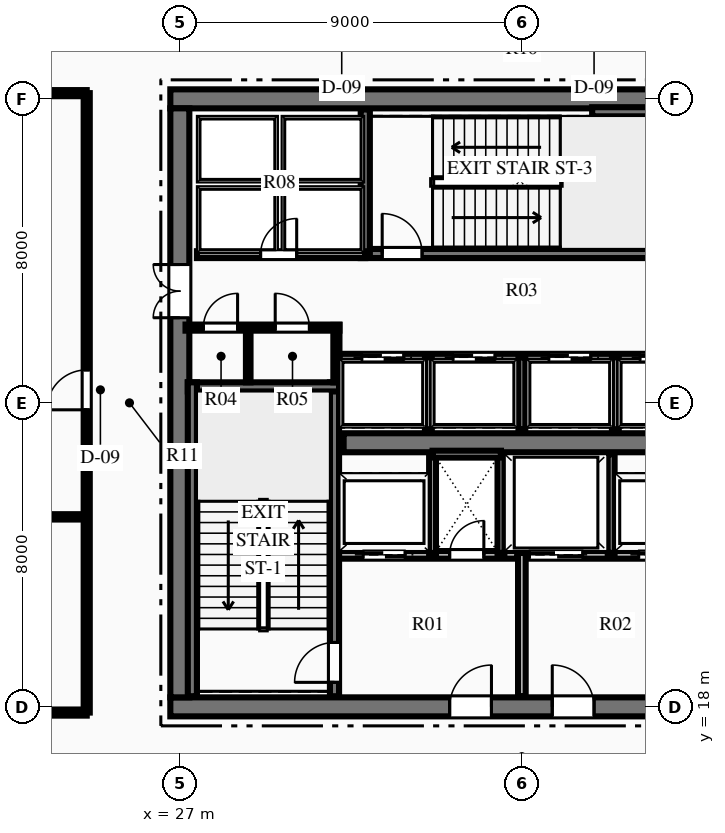
"""IFC4 building model, lengths in metres.
Left out: names, types, materials, properties, quantities, classifications, styles, units other than length and angle.
Written with IfcOpenShell. Run it as: python <this file> out.ifc"""

import sys

from ifc_helpers import new_model, si_unit, direction, frame, frame_2d, origin, place, context, subcontext, project, spatial, rectangle, extrude, element, fill, save


model = new_model("IFC4")
c1 = context("Model", 3, precision=1e-05, world=origin(), true_north=direction((0.0, 1.0)))
c2 = subcontext(c1, "Body", "Model", "MODEL_VIEW")
j1 = project(units=[si_unit("LENGTHUNIT", "METRE"), si_unit("PLANEANGLEUNIT", "RADIAN")], contexts=[c1])
p1 = place(None, origin())
s1 = spatial("IfcSite", under=j1, at=p1, CompositionType="ELEMENT")
p2 = place(p1, origin())
s2 = spatial("IfcBuilding", under=s1, at=p2, CompositionType="ELEMENT")
p3 = place(p2, frame((0.0, 0.0, 136.2)))
s3 = spatial("IfcBuildingStorey", under=s2, at=p3, CompositionType="ELEMENT", Elevation=136.2)
p4 = place(p3, frame((26.75, 18.0, 0.0), z_axis=(0.0, 0.0, 1.0), x_axis=(1.0, 0.0, 0.0)))
e1 = element("IfcWall", 1, at=p4, inside=s3, PredefinedType="SHEAR", context=c2, shape_type="SweptSolid", body=[
    extrude(rectangle(XDim=18.5, YDim=0.5, at=frame_2d((9.25, 0.0))), origin(), (0.0, 0.0, 1.0), 4.5),
])
p5 = place(p4, frame((7.35, 0.0, 0.0)))
e2 = element("IfcOpeningElement", 2, at=p5, cuts=e1, PredefinedType="OPENING", context=c2, shape_type="SweptSolid", body=[
    extrude(rectangle(XDim=1.1, YDim=2.15, at=frame_2d((0.55, 1.075))), frame((0.0, 0.26, 0.0), z_axis=(0.0, -1.0, 0.0), x_axis=(1.0, 0.0, 0.0)), (0.0, 0.0, 1.0), 0.52),
])
p6 = place(p4, frame((10.05, 0.0, 0.0)))
e3 = element("IfcOpeningElement", 3, at=p6, cuts=e1, PredefinedType="OPENING", context=c2, shape_type="SweptSolid", body=[
    extrude(rectangle(XDim=1.1, YDim=2.15, at=frame_2d((0.55, 1.075))), frame((0.0, 0.26, 0.0), z_axis=(0.0, -1.0, 0.0), x_axis=(1.0, 0.0, 0.0)), (0.0, 0.0, 1.0), 0.52),
])
p7 = place(p3, frame((26.75, 34.0, 0.0), z_axis=(0.0, 0.0, 1.0), x_axis=(1.0, 0.0, 0.0)))
e4 = element("IfcWall", 4, at=p7, inside=s3, PredefinedType="SHEAR", context=c2, shape_type="SweptSolid", body=[
    extrude(rectangle(XDim=18.5, YDim=0.5, at=frame_2d((9.25, 0.0))), origin(), (0.0, 0.0, 1.0), 4.5),
])
p8 = place(p7, frame((13.935, 0.0, 0.0)))
e5 = element("IfcOpeningElement", 5, at=p8, cuts=e4, PredefinedType="OPENING", context=c2, shape_type="SweptSolid", body=[
    extrude(rectangle(XDim=1.1, YDim=2.15, at=frame_2d((0.55, 1.075))), frame((0.0, 0.26, 0.0), z_axis=(0.0, -1.0, 0.0), x_axis=(1.0, 0.0, 0.0)), (0.0, 0.0, 1.0), 0.52),
])
p9 = place(p7, frame((16.185, 0.0, 0.0)))
e6 = element("IfcOpeningElement", 6, at=p9, cuts=e4, PredefinedType="OPENING", context=c2, shape_type="SweptSolid", body=[
    extrude(rectangle(XDim=1.1, YDim=2.15, at=frame_2d((0.55, 1.075))), frame((0.0, 0.26, 0.0), z_axis=(0.0, -1.0, 0.0), x_axis=(1.0, 0.0, 0.0)), (0.0, 0.0, 1.0), 0.52),
])
p10 = place(p3, frame((27.0, 18.25, 0.0), z_axis=(0.0, 0.0, 1.0), x_axis=(0.0, 1.0, 0.0)))
e7 = element("IfcWall", 7, at=p10, inside=s3, PredefinedType="SHEAR", context=c2, shape_type="SweptSolid", body=[
    extrude(rectangle(XDim=15.5, YDim=0.5, at=frame_2d((7.75, 0.0))), origin(), (0.0, 0.0, 1.0), 4.5),
])
p11 = place(p10, frame((9.99, 0.0, 0.0)))
e8 = element("IfcOpeningElement", 8, at=p11, cuts=e7, PredefinedType="OPENING", context=c2, shape_type="SweptSolid", body=[
    extrude(rectangle(XDim=1.4, YDim=2.2, at=frame_2d((0.7, 1.1))), frame((0.0, 0.26, 0.0), z_axis=(0.0, -1.0, 0.0), x_axis=(1.0, 0.0, 0.0)), (0.0, 0.0, 1.0), 0.52),
])
p12 = place(p3, frame((31.31, 24.95, 0.0), z_axis=(0.0, 0.0, 1.0), x_axis=(1.0, 0.0, 0.0)))
e9 = element("IfcWall", 9, at=p12, inside=s3, PredefinedType="SHEAR", context=c2, shape_type="SweptSolid", body=[
    extrude(rectangle(XDim=9.38, YDim=0.5, at=frame_2d((4.69, 0.0))), origin(), (0.0, 0.0, 1.0), 4.5),
])
p13 = place(p3, frame((31.07, 18.28, 0.0), z_axis=(0.0, 0.0, 1.0), x_axis=(0.0, 1.0, 0.0)))
e10 = element("IfcWall", 10, at=p13, inside=s3, PredefinedType="SHEAR", context=c2, shape_type="SweptSolid", body=[
    extrude(rectangle(XDim=8.26, YDim=0.24, at=frame_2d((4.13, 0.0))), origin(), (0.0, 0.0, 1.0), 4.5),
])
p14 = place(p13, frame((0.365, 0.0, 0.0)))
e11 = element("IfcOpeningElement", 11, at=p14, cuts=e10, PredefinedType="OPENING", context=c2, shape_type="SweptSolid", body=[
    extrude(rectangle(XDim=1.05, YDim=2.15, at=frame_2d((0.525, 1.075))), frame((0.0, 0.13, 0.0), z_axis=(0.0, -1.0, 0.0), x_axis=(1.0, 0.0, 0.0)), (0.0, 0.0, 1.0), 0.26),
])
p15 = place(p3, frame((27.21, 26.42, 0.0), z_axis=(0.0, 0.0, 1.0), x_axis=(1.0, 0.0, 0.0)))
e12 = element("IfcWall", 12, at=p15, inside=s3, PredefinedType="SHEAR", context=c2, shape_type="SweptSolid", body=[
    extrude(rectangle(XDim=3.98, YDim=0.24, at=frame_2d((1.99, 0.0))), origin(), (0.0, 0.0, 1.0), 4.5),
])
p16 = place(p3, frame((27.33, 18.28, 0.0), z_axis=(0.0, 0.0, 1.0), x_axis=(0.0, 1.0, 0.0)))
e13 = element("IfcWall", 13, at=p16, inside=s3, PredefinedType="SHEAR", context=c2, shape_type="SweptSolid", body=[
    extrude(rectangle(XDim=8.26, YDim=0.24, at=frame_2d((4.13, 0.0))), origin(), (0.0, 0.0, 1.0), 4.5),
])
p17 = place(p3, frame((31.76, 29.93, 0.0), z_axis=(0.0, 0.0, 1.0), x_axis=(1.0, 0.0, 0.0)))
e14 = element("IfcWall", 14, at=p17, inside=s3, PredefinedType="SHEAR", context=c2, shape_type="SweptSolid", body=[
    extrude(rectangle(XDim=8.38, YDim=0.24, at=frame_2d((4.19, 0.0))), origin(), (0.0, 0.0, 1.0), 4.5),
])
p18 = place(p17, frame((0.565, 0.0, 0.0)))
e15 = element("IfcOpeningElement", 15, at=p18, cuts=e14, PredefinedType="OPENING", context=c2, shape_type="SweptSolid", body=[
    extrude(rectangle(XDim=1.05, YDim=2.15, at=frame_2d((0.525, 1.075))), frame((0.0, 0.13, 0.0), z_axis=(0.0, -1.0, 0.0), x_axis=(1.0, 0.0, 0.0)), (0.0, 0.0, 1.0), 0.26),
])
p19 = place(p3, frame((31.88, 29.93, 0.0), z_axis=(0.0, 0.0, 1.0), x_axis=(0.0, 1.0, 0.0)))
e16 = element("IfcWall", 16, at=p19, inside=s3, PredefinedType="SHEAR", context=c2, shape_type="SweptSolid", body=[
    extrude(rectangle(XDim=3.79, YDim=0.24, at=frame_2d((1.895, 0.0))), origin(), (0.0, 0.0, 1.0), 4.5),
])
p20 = place(p3, frame((37.85, 33.66, 0.0), z_axis=(0.0, 0.0, 1.0), x_axis=(1.0, 0.0, 0.0)))
e17 = element("IfcWall", 17, at=p20, inside=s3, PredefinedType="SHEAR", context=c2, shape_type="SweptSolid", body=[
    extrude(rectangle(XDim=2.29, YDim=0.24, at=frame_2d((1.145, 0.0))), origin(), (0.0, 0.0, 1.0), 4.5),
])
p21 = place(p3, frame((36.0, 18.28, 0.0), z_axis=(0.0, 0.0, 1.0), x_axis=(0.0, 1.0, 0.0)))
e18 = element("IfcWall", 18, at=p21, inside=s3, PredefinedType="PARTITIONING", context=c2, shape_type="SweptSolid", body=[
    extrude(rectangle(XDim=3.77, YDim=0.2, at=frame_2d((1.885, 0.0))), origin(), (0.0, 0.0, 1.0), 4.21),
])
p22 = place(p3, frame((31.19, 22.0, 0.0), z_axis=(0.0, 0.0, 1.0), x_axis=(1.0, 0.0, 0.0)))
e19 = element("IfcWall", 19, at=p22, inside=s3, PredefinedType="PARTITIONING", context=c2, shape_type="SweptSolid", body=[
    extrude(rectangle(XDim=4.69, YDim=0.2, at=frame_2d((2.345, 0.0))), origin(), (0.0, 0.0, 1.0), 4.21),
])
p23 = place(p22, frame((2.91, 0.0, 0.0)))
e20 = element("IfcOpeningElement", 20, at=p23, cuts=e19, PredefinedType="OPENING", context=c2, shape_type="SweptSolid", body=[
    extrude(rectangle(XDim=0.9, YDim=2.15, at=frame_2d((0.45, 1.075))), frame((0.0, 0.11, 0.0), z_axis=(0.0, -1.0, 0.0), x_axis=(1.0, 0.0, 0.0)), (0.0, 0.0, 1.0), 0.22),
])
p24 = place(p22, frame((0.635, 0.0, 0.0)))
e21 = element("IfcOpeningElement", 21, at=p24, cuts=e19, PredefinedType="OPENING", context=c2, shape_type="SweptSolid", body=[
    extrude(rectangle(XDim=1.1, YDim=2.15, at=frame_2d((0.55, 1.075))), frame((0.0, 0.11, 0.0), z_axis=(0.0, -1.0, 0.0), x_axis=(1.0, 0.0, 0.0)), (0.0, 0.0, 1.0), 0.22),
])
p25 = place(p3, frame((36.12, 22.0, 0.0), z_axis=(0.0, 0.0, 1.0), x_axis=(1.0, 0.0, 0.0)))
e22 = element("IfcWall", 22, at=p25, inside=s3, PredefinedType="PARTITIONING", context=c2, shape_type="SweptSolid", body=[
    extrude(rectangle(XDim=4.69, YDim=0.2, at=frame_2d((2.345, 0.0))), origin(), (0.0, 0.0, 1.0), 4.21),
])
p26 = place(p25, frame((2.955, 0.0, 0.0)))
e23 = element("IfcOpeningElement", 23, at=p26, cuts=e22, PredefinedType="OPENING", context=c2, shape_type="SweptSolid", body=[
    extrude(rectangle(XDim=1.1, YDim=2.15, at=frame_2d((0.55, 1.075))), frame((0.0, 0.11, 0.0), z_axis=(0.0, -1.0, 0.0), x_axis=(1.0, 0.0, 0.0)), (0.0, 0.0, 1.0), 0.22),
])
p27 = place(p25, frame((0.08, 0.0, 0.0)))
e24 = element("IfcOpeningElement", 24, at=p27, cuts=e22, PredefinedType="OPENING", context=c2, shape_type="SweptSolid", body=[
    extrude(rectangle(XDim=1.4, YDim=2.2, at=frame_2d((0.7, 1.1))), frame((0.0, 0.11, 0.0), z_axis=(0.0, -1.0, 0.0), x_axis=(1.0, 0.0, 0.0)), (0.0, 0.0, 1.0), 0.22),
])
for number, where, z_axis, x_axis in (
    (25, (33.65, 22.05, 0.0), (0.0, 0.0, 1.0), (0.0, 1.0, 0.0)),
    (26, (35.45, 22.05, 0.0), (0.0, 0.0, 1.0), (0.0, 1.0, 0.0)),
):
    element("IfcWall", number, at=place(p3, frame(where, z_axis=z_axis, x_axis=x_axis)), inside=s3, PredefinedType="PARTITIONING", context=c2, shape_type="SweptSolid", body=[
        extrude(rectangle(XDim=2.6, YDim=0.18, at=frame_2d((1.3, 0.0))), origin(), (0.0, 0.0, 1.0), 4.21),
    ])
p28 = place(p3, frame((33.65, 24.65, 0.0), z_axis=(0.0, 0.0, 1.0), x_axis=(1.0, 0.0, 0.0)))
e27 = element("IfcWall", 27, at=p28, inside=s3, PredefinedType="PARTITIONING", context=c2, shape_type="SweptSolid", body=[
    extrude(rectangle(XDim=1.8, YDim=0.18, at=frame_2d((0.9, 0.0))), origin(), (0.0, 0.0, 1.0), 4.21),
])
p29 = place(p3, frame((38.35, 22.05, 0.0), z_axis=(0.0, 0.0, 1.0), x_axis=(0.0, 1.0, 0.0)))
e28 = element("IfcWall", 28, at=p29, inside=s3, PredefinedType="PARTITIONING", context=c2, shape_type="SweptSolid", body=[
    extrude(rectangle(XDim=2.6, YDim=0.18, at=frame_2d((1.3, 0.0))), origin(), (0.0, 0.0, 1.0), 4.21),
])
p30 = place(p3, frame((27.15, 27.98, 0.0), z_axis=(0.0, 0.0, 1.0), x_axis=(1.0, 0.0, 0.0)))
e29 = element("IfcWall", 29, at=p30, inside=s3, PredefinedType="PARTITIONING", context=c2, shape_type="SweptSolid", body=[
    extrude(rectangle(XDim=4.05, YDim=0.16, at=frame_2d((2.025, 0.0))), origin(), (0.0, 0.0, 1.0), 4.21),
])
p31 = place(p30, frame((0.47, 0.0, 0.0)))
e30 = element("IfcOpeningElement", 30, at=p31, cuts=e29, PredefinedType="OPENING", context=c2, shape_type="SweptSolid", body=[
    extrude(rectangle(XDim=0.9, YDim=2.15, at=frame_2d((0.45, 1.075))), frame((0.0, 0.09, 0.0), z_axis=(0.0, -1.0, 0.0), x_axis=(1.0, 0.0, 0.0)), (0.0, 0.0, 1.0), 0.18),
])
p32 = place(p30, frame((2.36, 0.0, 0.0)))
e31 = element("IfcOpeningElement", 31, at=p32, cuts=e29, PredefinedType="OPENING", context=c2, shape_type="SweptSolid", body=[
    extrude(rectangle(XDim=0.9, YDim=2.15, at=frame_2d((0.45, 1.075))), frame((0.0, 0.09, 0.0), z_axis=(0.0, -1.0, 0.0), x_axis=(1.0, 0.0, 0.0)), (0.0, 0.0, 1.0), 0.18),
])
p33 = place(p3, frame((31.12, 26.54, 0.0), z_axis=(0.0, 0.0, 1.0), x_axis=(0.0, 1.0, 0.0)))
e32 = element("IfcWall", 32, at=p33, inside=s3, PredefinedType="PARTITIONING", context=c2, shape_type="SweptSolid", body=[
    extrude(rectangle(XDim=1.51, YDim=0.16, at=frame_2d((0.755, 0.0))), origin(), (0.0, 0.0, 1.0), 4.21),
])
p34 = place(p3, frame((28.8, 26.54, 0.0), z_axis=(0.0, 0.0, 1.0), x_axis=(0.0, 1.0, 0.0)))
e33 = element("IfcWall", 33, at=p34, inside=s3, PredefinedType="PARTITIONING", context=c2, shape_type="SweptSolid", body=[
    extrude(rectangle(XDim=1.44, YDim=0.12, at=frame_2d((0.72, 0.0))), origin(), (0.0, 0.0, 1.0), 4.21),
])
p35 = place(p3, frame((27.45, 29.9, 0.0), z_axis=(0.0, 0.0, 1.0), x_axis=(1.0, 0.0, 0.0)))
e34 = element("IfcWall", 34, at=p35, inside=s3, PredefinedType="PARTITIONING", context=c2, shape_type="SweptSolid", body=[
    extrude(rectangle(XDim=4.43, YDim=0.18, at=frame_2d((2.215, 0.0))), origin(), (0.0, 0.0, 1.0), 4.21),
])
p36 = place(p35, frame((1.675, 0.0, 0.0)))
e35 = element("IfcOpeningElement", 35, at=p36, cuts=e34, PredefinedType="OPENING", context=c2, shape_type="SweptSolid", body=[
    extrude(rectangle(XDim=0.95, YDim=2.15, at=frame_2d((0.475, 1.075))), frame((0.0, 0.1, 0.0), z_axis=(0.0, -1.0, 0.0), x_axis=(1.0, 0.0, 0.0)), (0.0, 0.0, 1.0), 0.2),
])
p37 = place(p3, frame((31.2, 27.2, 0.0), z_axis=(0.0, 0.0, 1.0), x_axis=(1.0, 0.0, 0.0)))
e36 = element("IfcWall", 36, at=p37, inside=s3, PredefinedType="PARTITIONING", context=c2, shape_type="SweptSolid", body=[
    extrude(rectangle(XDim=9.6, YDim=0.18, at=frame_2d((4.8, 0.0))), origin(), (0.0, 0.0, 1.0), 4.21),
])
p38 = place(p37, frame((0.59, 0.0, 0.0)))
e37 = element("IfcOpeningElement", 37, at=p38, cuts=e36, PredefinedType="OPENING", context=c2, shape_type="SweptSolid", body=[
    extrude(rectangle(XDim=1.1, YDim=2.15, at=frame_2d((0.55, 1.075))), frame((0.0, 0.1, 0.0), z_axis=(0.0, -1.0, 0.0), x_axis=(1.0, 0.0, 0.0)), (0.0, 0.0, 1.0), 0.2),
])
p39 = place(p37, frame((2.99, 0.0, 0.0)))
e38 = element("IfcOpeningElement", 38, at=p39, cuts=e36, PredefinedType="OPENING", context=c2, shape_type="SweptSolid", body=[
    extrude(rectangle(XDim=1.1, YDim=2.15, at=frame_2d((0.55, 1.075))), frame((0.0, 0.1, 0.0), z_axis=(0.0, -1.0, 0.0), x_axis=(1.0, 0.0, 0.0)), (0.0, 0.0, 1.0), 0.2),
])
p40 = place(p37, frame((5.51, 0.0, 0.0)))
e39 = element("IfcOpeningElement", 39, at=p40, cuts=e36, PredefinedType="OPENING", context=c2, shape_type="SweptSolid", body=[
    extrude(rectangle(XDim=1.1, YDim=2.15, at=frame_2d((0.55, 1.075))), frame((0.0, 0.1, 0.0), z_axis=(0.0, -1.0, 0.0), x_axis=(1.0, 0.0, 0.0)), (0.0, 0.0, 1.0), 0.2),
])
p41 = place(p37, frame((7.91, 0.0, 0.0)))
e40 = element("IfcOpeningElement", 40, at=p41, cuts=e36, PredefinedType="OPENING", context=c2, shape_type="SweptSolid", body=[
    extrude(rectangle(XDim=1.1, YDim=2.15, at=frame_2d((0.55, 1.075))), frame((0.0, 0.1, 0.0), z_axis=(0.0, -1.0, 0.0), x_axis=(1.0, 0.0, 0.0)), (0.0, 0.0, 1.0), 0.2),
])
for number, where, z_axis, x_axis in (
    (41, (33.54, 25.3, 0.0), (0.0, 0.0, 1.0), (0.0, 1.0, 0.0)),
    (42, (36.0, 25.3, 0.0), (0.0, 0.0, 1.0), (0.0, 1.0, 0.0)),
    (43, (38.46, 25.3, 0.0), (0.0, 0.0, 1.0), (0.0, 1.0, 0.0)),
):
    element("IfcWall", number, at=place(p3, frame(where, z_axis=z_axis, x_axis=x_axis)), inside=s3, PredefinedType="PARTITIONING", context=c2, shape_type="SweptSolid", body=[
        extrude(rectangle(XDim=1.9, YDim=0.18, at=frame_2d((0.95, 0.0))), origin(), (0.0, 0.0, 1.0), 4.21),
    ])
p42 = place(p3, frame((18.2, 17.85, 0.0), z_axis=(0.0, 0.0, 1.0), x_axis=(1.0, 0.0, 0.0)))
e44 = element("IfcWall", 44, at=p42, inside=s3, PredefinedType="PARTITIONING", context=c2, shape_type="SweptSolid", body=[
    extrude(rectangle(XDim=6.35, YDim=0.16, at=frame_2d((3.175, 0.0))), origin(), (0.0, 0.0, 1.0), 4.21),
])
p43 = place(p42, frame((3.793, 0.0, 0.0)))
e45 = element("IfcOpeningElement", 45, at=p43, cuts=e44, PredefinedType="OPENING", context=c2, shape_type="SweptSolid", body=[
    extrude(rectangle(XDim=1.05, YDim=2.15, at=frame_2d((0.525, 1.075))), frame((0.0, 0.09, 0.0), z_axis=(0.0, -1.0, 0.0), x_axis=(1.0, 0.0, 0.0)), (0.0, 0.0, 1.0), 0.18),
])
p44 = place(p3, frame((18.2, 34.15, 0.0), z_axis=(0.0, 0.0, 1.0), x_axis=(1.0, 0.0, 0.0)))
e46 = element("IfcWall", 46, at=p44, inside=s3, PredefinedType="PARTITIONING", context=c2, shape_type="SweptSolid", body=[
    extrude(rectangle(XDim=6.35, YDim=0.16, at=frame_2d((3.175, 0.0))), origin(), (0.0, 0.0, 1.0), 4.21),
])
p45 = place(p3, frame((24.55, 17.85, 0.0), z_axis=(0.0, 0.0, 1.0), x_axis=(0.0, 1.0, 0.0)))
e47 = element("IfcWall", 47, at=p45, inside=s3, PredefinedType="PARTITIONING", context=c2, shape_type="SweptSolid", body=[
    extrude(rectangle(XDim=16.3, YDim=0.16, at=frame_2d((8.15, 0.0))), origin(), (0.0, 0.0, 1.0), 4.21),
])
p46 = place(p45, frame((7.967, 0.0, 0.0)))
e48 = element("IfcOpeningElement", 48, at=p46, cuts=e47, PredefinedType="OPENING", context=c2, shape_type="SweptSolid", body=[
    extrude(rectangle(XDim=1.05, YDim=2.15, at=frame_2d((0.525, 1.075))), frame((0.0, 0.09, 0.0), z_axis=(0.0, -1.0, 0.0), x_axis=(1.0, 0.0, 0.0)), (0.0, 0.0, 1.0), 0.18),
])
p47 = place(p3, frame((8.156, 23.0, 0.0), z_axis=(0.0, 0.0, 1.0), x_axis=(1.0, 0.0, 0.0)))
e49 = element("IfcWall", 49, at=p47, inside=s3, PredefinedType="PARTITIONING", context=c2, shape_type="SweptSolid", body=[
    extrude(rectangle(XDim=16.394, YDim=0.14, at=frame_2d((8.197, 0.0))), origin(), (0.0, 0.0, 1.0), 4.21),
])
p48 = place(p31, origin())
e50 = element("IfcDoor", 50, at=p48, inside=s3, OperationType="SINGLE_SWING_RIGHT", PredefinedType="DOOR", context=c2, shape_type="SweptSolid", body=[
    extrude(rectangle(XDim=0.9, YDim=2.15, at=frame_2d((0.45, 1.075))), frame((0.0, 0.025, 0.0), z_axis=(0.0, -1.0, 0.0), x_axis=(1.0, 0.0, 0.0)), (0.0, 0.0, 1.0), 0.05),
])
fill(e30, e50)
p49 = place(p32, origin())
e51 = element("IfcDoor", 51, at=p49, inside=s3, OperationType="SINGLE_SWING_LEFT", PredefinedType="DOOR", context=c2, shape_type="SweptSolid", body=[
    extrude(rectangle(XDim=0.9, YDim=2.15, at=frame_2d((0.45, 1.075))), frame((0.0, 0.025, 0.0), z_axis=(0.0, -1.0, 0.0), x_axis=(1.0, 0.0, 0.0)), (0.0, 0.0, 1.0), 0.05),
])
fill(e31, e51)
p50 = place(p36, origin())
e52 = element("IfcDoor", 52, at=p50, inside=s3, OperationType="SINGLE_SWING_RIGHT", PredefinedType="DOOR", context=c2, shape_type="SweptSolid", body=[
    extrude(rectangle(XDim=0.95, YDim=2.15, at=frame_2d((0.475, 1.075))), frame((0.0, 0.025, 0.0), z_axis=(0.0, -1.0, 0.0), x_axis=(1.0, 0.0, 0.0)), (0.0, 0.0, 1.0), 0.05),
])
fill(e35, e52)
p51 = place(p14, origin())
e53 = element("IfcDoor", 53, at=p51, inside=s3, OperationType="SINGLE_SWING_LEFT", PredefinedType="DOOR", context=c2, shape_type="SweptSolid", body=[
    extrude(rectangle(XDim=1.05, YDim=2.15, at=frame_2d((0.525, 1.075))), frame((0.0, 0.025, 0.0), z_axis=(0.0, -1.0, 0.0), x_axis=(1.0, 0.0, 0.0)), (0.0, 0.0, 1.0), 0.05),
])
fill(e11, e53)
p52 = place(p18, origin())
e54 = element("IfcDoor", 54, at=p52, inside=s3, OperationType="SINGLE_SWING_LEFT", PredefinedType="DOOR", context=c2, shape_type="SweptSolid", body=[
    extrude(rectangle(XDim=1.05, YDim=2.15, at=frame_2d((0.525, 1.075))), frame((0.0, 0.025, 0.0), z_axis=(0.0, -1.0, 0.0), x_axis=(1.0, 0.0, 0.0)), (0.0, 0.0, 1.0), 0.05),
])
fill(e15, e54)
p53 = place(p5, origin())
e55 = element("IfcDoor", 55, at=p53, inside=s3, OperationType="SINGLE_SWING_RIGHT", PredefinedType="DOOR", context=c2, shape_type="SweptSolid", body=[
    extrude(rectangle(XDim=1.1, YDim=2.15, at=frame_2d((0.55, 1.075))), frame((0.0, 0.025, 0.0), z_axis=(0.0, -1.0, 0.0), x_axis=(1.0, 0.0, 0.0)), (0.0, 0.0, 1.0), 0.05),
])
fill(e2, e55)
p54 = place(p6, origin())
e56 = element("IfcDoor", 56, at=p54, inside=s3, OperationType="SINGLE_SWING_LEFT", PredefinedType="DOOR", context=c2, shape_type="SweptSolid", body=[
    extrude(rectangle(XDim=1.1, YDim=2.15, at=frame_2d((0.55, 1.075))), frame((0.0, 0.025, 0.0), z_axis=(0.0, -1.0, 0.0), x_axis=(1.0, 0.0, 0.0)), (0.0, 0.0, 1.0), 0.05),
])
fill(e3, e56)
p55 = place(p23, origin())
e57 = element("IfcDoor", 57, at=p55, inside=s3, OperationType="SINGLE_SWING_RIGHT", PredefinedType="DOOR", context=c2, shape_type="SweptSolid", body=[
    extrude(rectangle(XDim=0.9, YDim=2.15, at=frame_2d((0.45, 1.075))), frame((0.0, 0.025, 0.0), z_axis=(0.0, -1.0, 0.0), x_axis=(1.0, 0.0, 0.0)), (0.0, 0.0, 1.0), 0.05),
])
fill(e20, e57)
p56 = place(p11, origin())
e58 = element("IfcDoor", 58, at=p56, inside=s3, OperationType="DOUBLE_DOOR_SINGLE_SWING", PredefinedType="DOOR", context=c2, shape_type="SweptSolid", body=[
    extrude(rectangle(XDim=1.4, YDim=2.2, at=frame_2d((0.7, 1.1))), frame((0.0, 0.025, 0.0), z_axis=(0.0, -1.0, 0.0), x_axis=(1.0, 0.0, 0.0)), (0.0, 0.0, 1.0), 0.05),
])
fill(e8, e58)
p57 = place(p46, origin())
e59 = element("IfcDoor", 59, at=p57, inside=s3, OperationType="SINGLE_SWING_LEFT", PredefinedType="DOOR", context=c2, shape_type="SweptSolid", body=[
    extrude(rectangle(XDim=1.05, YDim=2.15, at=frame_2d((0.525, 1.075))), frame((0.0, 0.025, 0.0), z_axis=(0.0, -1.0, 0.0), x_axis=(1.0, 0.0, 0.0)), (0.0, 0.0, 1.0), 0.05),
])
fill(e48, e59)
p58 = place(p38, origin())
e60 = element("IfcDoor", 60, at=p58, inside=s3, OperationType="SLIDING_TO_LEFT", PredefinedType="DOOR", context=c2, shape_type="SweptSolid", body=[
    extrude(rectangle(XDim=1.1, YDim=2.15, at=frame_2d((0.55, 1.075))), frame((0.0, 0.025, 0.0), z_axis=(0.0, -1.0, 0.0), x_axis=(1.0, 0.0, 0.0)), (0.0, 0.0, 1.0), 0.05),
])
fill(e37, e60)
p59 = place(p39, origin())
e61 = element("IfcDoor", 61, at=p59, inside=s3, OperationType="SLIDING_TO_LEFT", PredefinedType="DOOR", context=c2, shape_type="SweptSolid", body=[
    extrude(rectangle(XDim=1.1, YDim=2.15, at=frame_2d((0.55, 1.075))), frame((0.0, 0.025, 0.0), z_axis=(0.0, -1.0, 0.0), x_axis=(1.0, 0.0, 0.0)), (0.0, 0.0, 1.0), 0.05),
])
fill(e38, e61)
p60 = place(p40, origin())
e62 = element("IfcDoor", 62, at=p60, inside=s3, OperationType="SLIDING_TO_LEFT", PredefinedType="DOOR", context=c2, shape_type="SweptSolid", body=[
    extrude(rectangle(XDim=1.1, YDim=2.15, at=frame_2d((0.55, 1.075))), frame((0.0, 0.025, 0.0), z_axis=(0.0, -1.0, 0.0), x_axis=(1.0, 0.0, 0.0)), (0.0, 0.0, 1.0), 0.05),
])
fill(e39, e62)
p61 = place(p41, origin())
e63 = element("IfcDoor", 63, at=p61, inside=s3, OperationType="SLIDING_TO_LEFT", PredefinedType="DOOR", context=c2, shape_type="SweptSolid", body=[
    extrude(rectangle(XDim=1.1, YDim=2.15, at=frame_2d((0.55, 1.075))), frame((0.0, 0.025, 0.0), z_axis=(0.0, -1.0, 0.0), x_axis=(1.0, 0.0, 0.0)), (0.0, 0.0, 1.0), 0.05),
])
fill(e40, e63)
p62 = place(p24, origin())
e64 = element("IfcDoor", 64, at=p62, inside=s3, OperationType="SLIDING_TO_LEFT", PredefinedType="DOOR", context=c2, shape_type="SweptSolid", body=[
    extrude(rectangle(XDim=1.1, YDim=2.15, at=frame_2d((0.55, 1.075))), frame((0.0, 0.025, 0.0), z_axis=(0.0, -1.0, 0.0), x_axis=(1.0, 0.0, 0.0)), (0.0, 0.0, 1.0), 0.05),
])
fill(e21, e64)
p63 = place(p26, origin())
e65 = element("IfcDoor", 65, at=p63, inside=s3, OperationType="SLIDING_TO_LEFT", PredefinedType="DOOR", context=c2, shape_type="SweptSolid", body=[
    extrude(rectangle(XDim=1.1, YDim=2.15, at=frame_2d((0.55, 1.075))), frame((0.0, 0.025, 0.0), z_axis=(0.0, -1.0, 0.0), x_axis=(1.0, 0.0, 0.0)), (0.0, 0.0, 1.0), 0.05),
])
fill(e23, e65)
p64 = place(p27, origin())
e66 = element("IfcDoor", 66, at=p64, inside=s3, OperationType="SLIDING_TO_LEFT", PredefinedType="DOOR", context=c2, shape_type="SweptSolid", body=[
    extrude(rectangle(XDim=1.4, YDim=2.2, at=frame_2d((0.7, 1.1))), frame((0.0, 0.025, 0.0), z_axis=(0.0, -1.0, 0.0), x_axis=(1.0, 0.0, 0.0)), (0.0, 0.0, 1.0), 0.05),
])
fill(e24, e66)
save(model, sys.argv[1])
